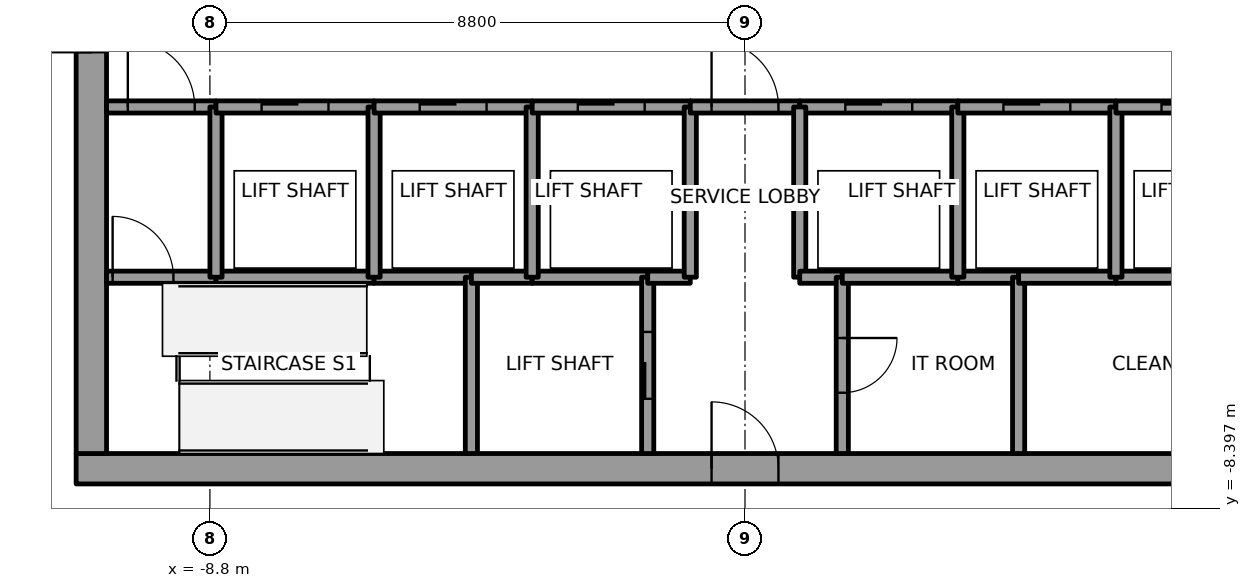
"""IFC4 building model, lengths in metres.
Left out: names, types, materials, properties, quantities, classifications, styles, units other than length and angle.
Written with IfcOpenShell. Run it as: python <this file> out.ifc"""

import sys

from ifc_helpers import new_model, si_unit, direction, frame, frame_2d, origin, place, context, subcontext, project, spatial, rectangle, extrude, element, fill, save


model = new_model("IFC4")
c1 = context("Model", 3, precision=1e-05, world=origin(), true_north=direction((0.0, 1.0)))
c2 = subcontext(c1, "Body", "Model", "MODEL_VIEW")
j1 = project(units=[si_unit("LENGTHUNIT", "METRE"), si_unit("PLANEANGLEUNIT", "RADIAN")], contexts=[c1])
p1 = place(None, origin())
s1 = spatial("IfcSite", under=j1, at=p1, CompositionType="ELEMENT")
p2 = place(p1, origin())
s2 = spatial("IfcBuilding", under=s1, at=p2, CompositionType="ELEMENT")
p3 = place(p2, frame((0.0, 0.0, 311.0)))
s3 = spatial("IfcBuildingStorey", under=s2, at=p3, CompositionType="ELEMENT", Elevation=311.0)
p4 = place(p3, frame((-11.0, -7.75, 0.0), z_axis=(0.0, 0.0, 1.0), x_axis=(1.0, 0.0, 0.0)))
e1 = element("IfcWall", 1, at=p4, inside=s3, PredefinedType="SHEAR", context=c2, shape_type="SweptSolid", body=[
    extrude(rectangle(XDim=22.0, YDim=0.5, at=frame_2d((11.0, 0.0))), origin(), (0.0, 0.0, 1.0), 4.0),
])
p5 = place(p4, frame((10.45, 0.0, 0.0)))
e2 = element("IfcOpeningElement", 2, at=p5, cuts=e1, PredefinedType="OPENING", context=c2, shape_type="SweptSolid", body=[
    extrude(rectangle(XDim=1.1, YDim=2.1, at=frame_2d((0.55, 1.05))), frame((0.0, 0.25, 0.0), z_axis=(0.0, -1.0, 0.0), x_axis=(1.0, 0.0, 0.0)), (0.0, 0.0, 1.0), 0.5),
])
p6 = place(p3, frame((-10.75, -7.5, 0.0), z_axis=(0.0, 0.0, 1.0), x_axis=(0.0, 1.0, 0.0)))
e3 = element("IfcWall", 3, at=p6, inside=s3, PredefinedType="SHEAR", context=c2, shape_type="SweptSolid", body=[
    extrude(rectangle(XDim=15.0, YDim=0.5, at=frame_2d((7.5, 0.0))), origin(), (0.0, 0.0, 1.0), 4.0),
])
p7 = place(p6, frame((6.6, 0.0, 0.0)))
e4 = element("IfcOpeningElement", 4, at=p7, cuts=e3, PredefinedType="OPENING", context=c2, shape_type="SweptSolid", body=[
    extrude(rectangle(XDim=1.8, YDim=2.1, at=frame_2d((0.9, 1.05))), frame((0.0, 0.25, 0.0), z_axis=(0.0, -1.0, 0.0), x_axis=(1.0, 0.0, 0.0)), (0.0, 0.0, 1.0), 0.5),
])
p8 = place(p3, frame((-10.5, -4.6, 0.0), z_axis=(0.0, 0.0, 1.0), x_axis=(1.0, 0.0, 0.0)))
e5 = element("IfcWall", 5, at=p8, inside=s3, PredefinedType="SOLIDWALL", context=c2, shape_type="SweptSolid", body=[
    extrude(rectangle(XDim=1.8, YDim=0.2, at=frame_2d((0.9, 0.0))), origin(), (0.0, 0.0, 1.0), 3.85),
])
p9 = place(p8, frame((0.1, 0.0, 0.0)))
e6 = element("IfcOpeningElement", 6, at=p9, cuts=e5, PredefinedType="OPENING", context=c2, shape_type="SweptSolid", body=[
    extrude(rectangle(XDim=1.0, YDim=2.1, at=frame_2d((0.5, 1.05))), frame((0.0, 0.1, 0.0), z_axis=(0.0, -1.0, 0.0), x_axis=(1.0, 0.0, 0.0)), (0.0, 0.0, 1.0), 0.2),
])
p10 = place(p3, frame((-10.5, -1.8, 0.0), z_axis=(0.0, 0.0, 1.0), x_axis=(1.0, 0.0, 0.0)))
e7 = element("IfcWall", 7, at=p10, inside=s3, PredefinedType="SOLIDWALL", context=c2, shape_type="SweptSolid", body=[
    extrude(rectangle(XDim=1.8, YDim=0.2, at=frame_2d((0.9, 0.0))), origin(), (0.0, 0.0, 1.0), 3.85),
])
p11 = place(p10, frame((0.35, 0.0, 0.0)))
e8 = element("IfcOpeningElement", 8, at=p11, cuts=e7, PredefinedType="OPENING", context=c2, shape_type="SweptSolid", body=[
    extrude(rectangle(XDim=1.1, YDim=2.1, at=frame_2d((0.55, 1.05))), frame((0.0, 0.1, 0.0), z_axis=(0.0, -1.0, 0.0), x_axis=(1.0, 0.0, 0.0)), (0.0, 0.0, 1.0), 0.2),
])
p12 = place(p3, frame((-8.7, -4.6, 0.0), z_axis=(0.0, 0.0, 1.0), x_axis=(1.0, 0.0, 0.0)))
e9 = element("IfcWall", 9, at=p12, inside=s3, PredefinedType="SOLIDWALL", context=c2, shape_type="SweptSolid", body=[
    extrude(rectangle(XDim=2.6, YDim=0.2, at=frame_2d((1.3, 0.0))), origin(), (0.0, 0.0, 1.0), 3.85),
])
p13 = place(p3, frame((-8.7, -4.6, 0.0), z_axis=(0.0, 0.0, 1.0), x_axis=(0.0, 1.0, 0.0)))
e10 = element("IfcWall", 10, at=p13, inside=s3, PredefinedType="SOLIDWALL", context=c2, shape_type="SweptSolid", body=[
    extrude(rectangle(XDim=2.8, YDim=0.2, at=frame_2d((1.4, 0.0))), origin(), (0.0, 0.0, 1.0), 3.85),
])
p14 = place(p3, frame((-8.7, -1.8, 0.0), z_axis=(0.0, 0.0, 1.0), x_axis=(1.0, 0.0, 0.0)))
e11 = element("IfcWall", 11, at=p14, inside=s3, PredefinedType="SOLIDWALL", context=c2, shape_type="SweptSolid", body=[
    extrude(rectangle(XDim=2.6, YDim=0.2, at=frame_2d((1.3, 0.0))), origin(), (0.0, 0.0, 1.0), 3.85),
])
p15 = place(p14, frame((0.75, 0.0, 0.0)))
e12 = element("IfcOpeningElement", 12, at=p15, cuts=e11, PredefinedType="OPENING", context=c2, shape_type="SweptSolid", body=[
    extrude(rectangle(XDim=1.1, YDim=2.1, at=frame_2d((0.55, 1.05))), frame((0.0, 0.1, 0.0), z_axis=(0.0, -1.0, 0.0), x_axis=(1.0, 0.0, 0.0)), (0.0, 0.0, 1.0), 0.2),
])
p16 = place(p3, frame((-6.1, -4.6, 0.0), z_axis=(0.0, 0.0, 1.0), x_axis=(1.0, 0.0, 0.0)))
e13 = element("IfcWall", 13, at=p16, inside=s3, PredefinedType="SOLIDWALL", context=c2, shape_type="SweptSolid", body=[
    extrude(rectangle(XDim=1.6, YDim=0.2, at=frame_2d((0.8, 0.0))), origin(), (0.0, 0.0, 1.0), 3.85),
])
p17 = place(p3, frame((-6.1, -4.6, 0.0), z_axis=(0.0, 0.0, 1.0), x_axis=(0.0, 1.0, 0.0)))
e14 = element("IfcWall", 14, at=p17, inside=s3, PredefinedType="SOLIDWALL", context=c2, shape_type="SweptSolid", body=[
    extrude(rectangle(XDim=2.8, YDim=0.2, at=frame_2d((1.4, 0.0))), origin(), (0.0, 0.0, 1.0), 3.85),
])
p18 = place(p3, frame((-6.1, -1.8, 0.0), z_axis=(0.0, 0.0, 1.0), x_axis=(1.0, 0.0, 0.0)))
e15 = element("IfcWall", 15, at=p18, inside=s3, PredefinedType="SOLIDWALL", context=c2, shape_type="SweptSolid", body=[
    extrude(rectangle(XDim=2.6, YDim=0.2, at=frame_2d((1.3, 0.0))), origin(), (0.0, 0.0, 1.0), 3.85),
])
p19 = place(p18, frame((0.75, 0.0, 0.0)))
e16 = element("IfcOpeningElement", 16, at=p19, cuts=e15, PredefinedType="OPENING", context=c2, shape_type="SweptSolid", body=[
    extrude(rectangle(XDim=1.1, YDim=2.1, at=frame_2d((0.55, 1.05))), frame((0.0, 0.1, 0.0), z_axis=(0.0, -1.0, 0.0), x_axis=(1.0, 0.0, 0.0)), (0.0, 0.0, 1.0), 0.2),
])
p20 = place(p3, frame((-4.5, -4.6, 0.0), z_axis=(0.0, 0.0, 1.0), x_axis=(0.0, -1.0, 0.0)))
e17 = element("IfcWall", 17, at=p20, inside=s3, PredefinedType="SOLIDWALL", context=c2, shape_type="SweptSolid", body=[
    extrude(rectangle(XDim=2.9, YDim=0.2, at=frame_2d((1.45, 0.0))), origin(), (0.0, 0.0, 1.0), 3.85),
])
p21 = place(p3, frame((-4.5, -4.6, 0.0), z_axis=(0.0, 0.0, 1.0), x_axis=(1.0, 0.0, 0.0)))
e18 = element("IfcWall", 18, at=p21, inside=s3, PredefinedType="SOLIDWALL", context=c2, shape_type="SweptSolid", body=[
    extrude(rectangle(XDim=1.0, YDim=0.2, at=frame_2d((0.5, 0.0))), origin(), (0.0, 0.0, 1.0), 3.85),
])
p22 = place(p3, frame((-3.5, -4.6, 0.0), z_axis=(0.0, 0.0, 1.0), x_axis=(1.0, 0.0, 0.0)))
e19 = element("IfcWall", 19, at=p22, inside=s3, PredefinedType="SOLIDWALL", context=c2, shape_type="SweptSolid", body=[
    extrude(rectangle(XDim=1.9, YDim=0.2, at=frame_2d((0.95, 0.0))), origin(), (0.0, 0.0, 1.0), 3.85),
])
p23 = place(p3, frame((-3.5, -4.6, 0.0), z_axis=(0.0, 0.0, 1.0), x_axis=(0.0, 1.0, 0.0)))
e20 = element("IfcWall", 20, at=p23, inside=s3, PredefinedType="SOLIDWALL", context=c2, shape_type="SweptSolid", body=[
    extrude(rectangle(XDim=2.8, YDim=0.2, at=frame_2d((1.4, 0.0))), origin(), (0.0, 0.0, 1.0), 3.85),
])
p24 = place(p3, frame((-3.5, -1.8, 0.0), z_axis=(0.0, 0.0, 1.0), x_axis=(1.0, 0.0, 0.0)))
e21 = element("IfcWall", 21, at=p24, inside=s3, PredefinedType="SOLIDWALL", context=c2, shape_type="SweptSolid", body=[
    extrude(rectangle(XDim=2.6, YDim=0.2, at=frame_2d((1.3, 0.0))), origin(), (0.0, 0.0, 1.0), 3.85),
])
p25 = place(p24, frame((0.75, 0.0, 0.0)))
e22 = element("IfcOpeningElement", 22, at=p25, cuts=e21, PredefinedType="OPENING", context=c2, shape_type="SweptSolid", body=[
    extrude(rectangle(XDim=1.1, YDim=2.1, at=frame_2d((0.55, 1.05))), frame((0.0, 0.1, 0.0), z_axis=(0.0, -1.0, 0.0), x_axis=(1.0, 0.0, 0.0)), (0.0, 0.0, 1.0), 0.2),
])
p26 = place(p3, frame((-1.6, -7.5, 0.0), z_axis=(0.0, 0.0, 1.0), x_axis=(0.0, 1.0, 0.0)))
e23 = element("IfcWall", 23, at=p26, inside=s3, PredefinedType="SOLIDWALL", context=c2, shape_type="SweptSolid", body=[
    extrude(rectangle(XDim=2.9, YDim=0.2, at=frame_2d((1.45, 0.0))), origin(), (0.0, 0.0, 1.0), 3.85),
])
p27 = place(p26, frame((0.9, 0.0, 0.0)))
e24 = element("IfcOpeningElement", 24, at=p27, cuts=e23, PredefinedType="OPENING", context=c2, shape_type="SweptSolid", body=[
    extrude(rectangle(XDim=1.1, YDim=2.1, at=frame_2d((0.55, 1.05))), frame((0.0, 0.1, 0.0), z_axis=(0.0, -1.0, 0.0), x_axis=(1.0, 0.0, 0.0)), (0.0, 0.0, 1.0), 0.2),
])
p28 = place(p3, frame((-1.6, -4.6, 0.0), z_axis=(0.0, 0.0, 1.0), x_axis=(1.0, 0.0, 0.0)))
e25 = element("IfcWall", 25, at=p28, inside=s3, PredefinedType="SOLIDWALL", context=c2, shape_type="SweptSolid", body=[
    extrude(rectangle(XDim=0.7, YDim=0.2, at=frame_2d((0.35, 0.0))), origin(), (0.0, 0.0, 1.0), 3.85),
])
p29 = place(p3, frame((-0.9, -4.6, 0.0), z_axis=(0.0, 0.0, 1.0), x_axis=(0.0, 1.0, 0.0)))
e26 = element("IfcWall", 26, at=p29, inside=s3, PredefinedType="SOLIDWALL", context=c2, shape_type="SweptSolid", body=[
    extrude(rectangle(XDim=2.8, YDim=0.2, at=frame_2d((1.4, 0.0))), origin(), (0.0, 0.0, 1.0), 3.85),
])
p30 = place(p3, frame((-0.9, -1.8, 0.0), z_axis=(0.0, 0.0, 1.0), x_axis=(1.0, 0.0, 0.0)))
e27 = element("IfcWall", 27, at=p30, inside=s3, PredefinedType="SOLIDWALL", context=c2, shape_type="SweptSolid", body=[
    extrude(rectangle(XDim=1.8, YDim=0.2, at=frame_2d((0.9, 0.0))), origin(), (0.0, 0.0, 1.0), 3.85),
])
p31 = place(p30, frame((0.35, 0.0, 0.0)))
e28 = element("IfcOpeningElement", 28, at=p31, cuts=e27, PredefinedType="OPENING", context=c2, shape_type="SweptSolid", body=[
    extrude(rectangle(XDim=1.1, YDim=2.1, at=frame_2d((0.55, 1.05))), frame((0.0, 0.1, 0.0), z_axis=(0.0, -1.0, 0.0), x_axis=(1.0, 0.0, 0.0)), (0.0, 0.0, 1.0), 0.2),
])
p32 = place(p3, frame((0.9, -1.8, 0.0), z_axis=(0.0, 0.0, 1.0), x_axis=(1.0, 0.0, 0.0)))
e29 = element("IfcWall", 29, at=p32, inside=s3, PredefinedType="SOLIDWALL", context=c2, shape_type="SweptSolid", body=[
    extrude(rectangle(XDim=2.6, YDim=0.2, at=frame_2d((1.3, 0.0))), origin(), (0.0, 0.0, 1.0), 3.85),
])
p33 = place(p32, frame((0.75, 0.0, 0.0)))
e30 = element("IfcOpeningElement", 30, at=p33, cuts=e29, PredefinedType="OPENING", context=c2, shape_type="SweptSolid", body=[
    extrude(rectangle(XDim=1.1, YDim=2.1, at=frame_2d((0.55, 1.05))), frame((0.0, 0.1, 0.0), z_axis=(0.0, -1.0, 0.0), x_axis=(1.0, 0.0, 0.0)), (0.0, 0.0, 1.0), 0.2),
])
p34 = place(p3, frame((0.9, -1.8, 0.0), z_axis=(0.0, 0.0, 1.0), x_axis=(0.0, -1.0, 0.0)))
e31 = element("IfcWall", 31, at=p34, inside=s3, PredefinedType="SOLIDWALL", context=c2, shape_type="SweptSolid", body=[
    extrude(rectangle(XDim=2.8, YDim=0.2, at=frame_2d((1.4, 0.0))), origin(), (0.0, 0.0, 1.0), 3.85),
])
p35 = place(p3, frame((0.9, -4.6, 0.0), z_axis=(0.0, 0.0, 1.0), x_axis=(1.0, 0.0, 0.0)))
e32 = element("IfcWall", 32, at=p35, inside=s3, PredefinedType="SOLIDWALL", context=c2, shape_type="SweptSolid", body=[
    extrude(rectangle(XDim=0.7, YDim=0.2, at=frame_2d((0.35, 0.0))), origin(), (0.0, 0.0, 1.0), 3.85),
])
p36 = place(p3, frame((1.6, -4.6, 0.0), z_axis=(0.0, 0.0, 1.0), x_axis=(0.0, -1.0, 0.0)))
e33 = element("IfcWall", 33, at=p36, inside=s3, PredefinedType="SOLIDWALL", context=c2, shape_type="SweptSolid", body=[
    extrude(rectangle(XDim=2.9, YDim=0.2, at=frame_2d((1.45, 0.0))), origin(), (0.0, 0.0, 1.0), 3.85),
])
p37 = place(p36, frame((1.0, 0.0, 0.0)))
e34 = element("IfcOpeningElement", 34, at=p37, cuts=e33, PredefinedType="OPENING", context=c2, shape_type="SweptSolid", body=[
    extrude(rectangle(XDim=0.9, YDim=2.1, at=frame_2d((0.45, 1.05))), frame((0.0, 0.1, 0.0), z_axis=(0.0, -1.0, 0.0), x_axis=(1.0, 0.0, 0.0)), (0.0, 0.0, 1.0), 0.2),
])
p38 = place(p3, frame((3.5, -4.6, 0.0), z_axis=(0.0, 0.0, 1.0), x_axis=(-1.0, 0.0, 0.0)))
e35 = element("IfcWall", 35, at=p38, inside=s3, PredefinedType="SOLIDWALL", context=c2, shape_type="SweptSolid", body=[
    extrude(rectangle(XDim=1.9, YDim=0.2, at=frame_2d((0.95, 0.0))), origin(), (0.0, 0.0, 1.0), 3.85),
])
p39 = place(p3, frame((4.5, -4.6, 0.0), z_axis=(0.0, 0.0, 1.0), x_axis=(-1.0, 0.0, 0.0)))
e36 = element("IfcWall", 36, at=p39, inside=s3, PredefinedType="SOLIDWALL", context=c2, shape_type="SweptSolid", body=[
    extrude(rectangle(XDim=1.0, YDim=0.2, at=frame_2d((0.5, 0.0))), origin(), (0.0, 0.0, 1.0), 3.85),
])
p40 = place(p3, frame((3.5, -4.6, 0.0), z_axis=(0.0, 0.0, 1.0), x_axis=(0.0, 1.0, 0.0)))
e37 = element("IfcWall", 37, at=p40, inside=s3, PredefinedType="SOLIDWALL", context=c2, shape_type="SweptSolid", body=[
    extrude(rectangle(XDim=2.8, YDim=0.2, at=frame_2d((1.4, 0.0))), origin(), (0.0, 0.0, 1.0), 3.85),
])
p41 = place(p3, frame((3.5, -1.8, 0.0), z_axis=(0.0, 0.0, 1.0), x_axis=(1.0, 0.0, 0.0)))
e38 = element("IfcWall", 38, at=p41, inside=s3, PredefinedType="SOLIDWALL", context=c2, shape_type="SweptSolid", body=[
    extrude(rectangle(XDim=2.6, YDim=0.2, at=frame_2d((1.3, 0.0))), origin(), (0.0, 0.0, 1.0), 3.85),
])
p42 = place(p41, frame((0.75, 0.0, 0.0)))
e39 = element("IfcOpeningElement", 39, at=p42, cuts=e38, PredefinedType="OPENING", context=c2, shape_type="SweptSolid", body=[
    extrude(rectangle(XDim=1.1, YDim=2.1, at=frame_2d((0.55, 1.05))), frame((0.0, 0.1, 0.0), z_axis=(0.0, -1.0, 0.0), x_axis=(1.0, 0.0, 0.0)), (0.0, 0.0, 1.0), 0.2),
])
p43 = place(p3, frame((4.5, -4.6, 0.0), z_axis=(0.0, 0.0, 1.0), x_axis=(0.0, -1.0, 0.0)))
e40 = element("IfcWall", 40, at=p43, inside=s3, PredefinedType="SOLIDWALL", context=c2, shape_type="SweptSolid", body=[
    extrude(rectangle(XDim=2.9, YDim=0.2, at=frame_2d((1.45, 0.0))), origin(), (0.0, 0.0, 1.0), 3.85),
])
p44 = place(p3, frame((6.1, -4.6, 0.0), z_axis=(0.0, 0.0, 1.0), x_axis=(-1.0, 0.0, 0.0)))
e41 = element("IfcWall", 41, at=p44, inside=s3, PredefinedType="SOLIDWALL", context=c2, shape_type="SweptSolid", body=[
    extrude(rectangle(XDim=1.6, YDim=0.2, at=frame_2d((0.8, 0.0))), origin(), (0.0, 0.0, 1.0), 3.85),
])
p45 = place(p3, frame((8.7, -4.6, 0.0), z_axis=(0.0, 0.0, 1.0), x_axis=(-1.0, 0.0, 0.0)))
e42 = element("IfcWall", 42, at=p45, inside=s3, PredefinedType="SOLIDWALL", context=c2, shape_type="SweptSolid", body=[
    extrude(rectangle(XDim=2.6, YDim=0.2, at=frame_2d((1.3, 0.0))), origin(), (0.0, 0.0, 1.0), 3.85),
])
p46 = place(p3, frame((6.1, -4.6, 0.0), z_axis=(0.0, 0.0, 1.0), x_axis=(0.0, 1.0, 0.0)))
e43 = element("IfcWall", 43, at=p46, inside=s3, PredefinedType="SOLIDWALL", context=c2, shape_type="SweptSolid", body=[
    extrude(rectangle(XDim=2.8, YDim=0.2, at=frame_2d((1.4, 0.0))), origin(), (0.0, 0.0, 1.0), 3.85),
])
p47 = place(p3, frame((6.1, -1.8, 0.0), z_axis=(0.0, 0.0, 1.0), x_axis=(1.0, 0.0, 0.0)))
e44 = element("IfcWall", 44, at=p47, inside=s3, PredefinedType="SOLIDWALL", context=c2, shape_type="SweptSolid", body=[
    extrude(rectangle(XDim=2.6, YDim=0.2, at=frame_2d((1.3, 0.0))), origin(), (0.0, 0.0, 1.0), 3.85),
])
p48 = place(p47, frame((0.75, 0.0, 0.0)))
e45 = element("IfcOpeningElement", 45, at=p48, cuts=e44, PredefinedType="OPENING", context=c2, shape_type="SweptSolid", body=[
    extrude(rectangle(XDim=1.1, YDim=2.1, at=frame_2d((0.55, 1.05))), frame((0.0, 0.1, 0.0), z_axis=(0.0, -1.0, 0.0), x_axis=(1.0, 0.0, 0.0)), (0.0, 0.0, 1.0), 0.2),
])
p49 = place(p15, origin())
e46 = element("IfcDoor", 46, at=p49, inside=s3, OperationType="SLIDING_TO_RIGHT", PredefinedType="DOOR", context=c2, shape_type="SweptSolid", body=[
    extrude(rectangle(XDim=1.1, YDim=2.1, at=frame_2d((0.55, 1.05))), frame((0.0, 0.025, 0.0), z_axis=(0.0, -1.0, 0.0), x_axis=(1.0, 0.0, 0.0)), (0.0, 0.0, 1.0), 0.05),
])
fill(e12, e46)
p50 = place(p19, origin())
e47 = element("IfcDoor", 47, at=p50, inside=s3, OperationType="SLIDING_TO_RIGHT", PredefinedType="DOOR", context=c2, shape_type="SweptSolid", body=[
    extrude(rectangle(XDim=1.1, YDim=2.1, at=frame_2d((0.55, 1.05))), frame((0.0, 0.025, 0.0), z_axis=(0.0, -1.0, 0.0), x_axis=(1.0, 0.0, 0.0)), (0.0, 0.0, 1.0), 0.05),
])
fill(e16, e47)
p51 = place(p25, origin())
e48 = element("IfcDoor", 48, at=p51, inside=s3, OperationType="SLIDING_TO_RIGHT", PredefinedType="DOOR", context=c2, shape_type="SweptSolid", body=[
    extrude(rectangle(XDim=1.1, YDim=2.1, at=frame_2d((0.55, 1.05))), frame((0.0, 0.025, 0.0), z_axis=(0.0, -1.0, 0.0), x_axis=(1.0, 0.0, 0.0)), (0.0, 0.0, 1.0), 0.05),
])
fill(e22, e48)
p52 = place(p33, origin())
e49 = element("IfcDoor", 49, at=p52, inside=s3, OperationType="SLIDING_TO_RIGHT", PredefinedType="DOOR", context=c2, shape_type="SweptSolid", body=[
    extrude(rectangle(XDim=1.1, YDim=2.1, at=frame_2d((0.55, 1.05))), frame((0.0, 0.025, 0.0), z_axis=(0.0, -1.0, 0.0), x_axis=(1.0, 0.0, 0.0)), (0.0, 0.0, 1.0), 0.05),
])
fill(e30, e49)
p53 = place(p42, origin())
e50 = element("IfcDoor", 50, at=p53, inside=s3, OperationType="SLIDING_TO_LEFT", PredefinedType="DOOR", context=c2, shape_type="SweptSolid", body=[
    extrude(rectangle(XDim=1.1, YDim=2.1, at=frame_2d((0.55, 1.05))), frame((0.0, 0.025, 0.0), z_axis=(0.0, -1.0, 0.0), x_axis=(1.0, 0.0, 0.0)), (0.0, 0.0, 1.0), 0.05),
])
fill(e39, e50)
p54 = place(p48, origin())
e51 = element("IfcDoor", 51, at=p54, inside=s3, OperationType="SLIDING_TO_LEFT", PredefinedType="DOOR", context=c2, shape_type="SweptSolid", body=[
    extrude(rectangle(XDim=1.1, YDim=2.1, at=frame_2d((0.55, 1.05))), frame((0.0, 0.025, 0.0), z_axis=(0.0, -1.0, 0.0), x_axis=(1.0, 0.0, 0.0)), (0.0, 0.0, 1.0), 0.05),
])
fill(e45, e51)
p55 = place(p27, origin())
e52 = element("IfcDoor", 52, at=p55, inside=s3, OperationType="SLIDING_TO_RIGHT", PredefinedType="DOOR", context=c2, shape_type="SweptSolid", body=[
    extrude(rectangle(XDim=1.1, YDim=2.1, at=frame_2d((0.55, 1.05))), frame((0.0, 0.025, 0.0), z_axis=(0.0, -1.0, 0.0), x_axis=(1.0, 0.0, 0.0)), (0.0, 0.0, 1.0), 0.05),
])
fill(e24, e52)
p56 = place(p11, origin())
e53 = element("IfcDoor", 53, at=p56, inside=s3, OperationType="SINGLE_SWING_RIGHT", PredefinedType="DOOR", context=c2, shape_type="SweptSolid", body=[
    extrude(rectangle(XDim=1.1, YDim=2.1, at=frame_2d((0.55, 1.05))), frame((0.0, 0.025, 0.0), z_axis=(0.0, -1.0, 0.0), x_axis=(1.0, 0.0, 0.0)), (0.0, 0.0, 1.0), 0.05),
])
fill(e8, e53)
p57 = place(p31, origin())
e54 = element("IfcDoor", 54, at=p57, inside=s3, OperationType="SINGLE_SWING_RIGHT", PredefinedType="DOOR", context=c2, shape_type="SweptSolid", body=[
    extrude(rectangle(XDim=1.1, YDim=2.1, at=frame_2d((0.55, 1.05))), frame((0.0, 0.025, 0.0), z_axis=(0.0, -1.0, 0.0), x_axis=(1.0, 0.0, 0.0)), (0.0, 0.0, 1.0), 0.05),
])
fill(e28, e54)
p58 = place(p9, origin())
e55 = element("IfcDoor", 55, at=p58, inside=s3, OperationType="SINGLE_SWING_LEFT", PredefinedType="DOOR", context=c2, shape_type="SweptSolid", body=[
    extrude(rectangle(XDim=1.0, YDim=2.1, at=frame_2d((0.5, 1.05))), frame((0.0, 0.025, 0.0), z_axis=(0.0, -1.0, 0.0), x_axis=(1.0, 0.0, 0.0)), (0.0, 0.0, 1.0), 0.05),
])
fill(e6, e55)
p59 = place(p37, origin())
e56 = element("IfcDoor", 56, at=p59, inside=s3, OperationType="SINGLE_SWING_RIGHT", PredefinedType="DOOR", context=c2, shape_type="SweptSolid", body=[
    extrude(rectangle(XDim=0.9, YDim=2.1, at=frame_2d((0.45, 1.05))), frame((0.0, 0.025, 0.0), z_axis=(0.0, -1.0, 0.0), x_axis=(1.0, 0.0, 0.0)), (0.0, 0.0, 1.0), 0.05),
])
fill(e34, e56)
p60 = place(p7, origin())
e57 = element("IfcDoor", 57, at=p60, inside=s3, OperationType="DOUBLE_DOOR_SINGLE_SWING", PredefinedType="DOOR", context=c2, shape_type="SweptSolid", body=[
    extrude(rectangle(XDim=1.8, YDim=2.1, at=frame_2d((0.9, 1.05))), frame((0.0, 0.025, 0.0), z_axis=(0.0, -1.0, 0.0), x_axis=(1.0, 0.0, 0.0)), (0.0, 0.0, 1.0), 0.05),
])
fill(e4, e57)
p61 = place(p5, origin())
e58 = element("IfcDoor", 58, at=p61, inside=s3, OperationType="SINGLE_SWING_LEFT", PredefinedType="DOOR", context=c2, shape_type="SweptSolid", body=[
    extrude(rectangle(XDim=1.1, YDim=2.1, at=frame_2d((0.55, 1.05))), frame((0.0, 0.025, 0.0), z_axis=(0.0, -1.0, 0.0), x_axis=(1.0, 0.0, 0.0)), (0.0, 0.0, 1.0), 0.05),
])
fill(e2, e58)
save(model, sys.argv[1])
